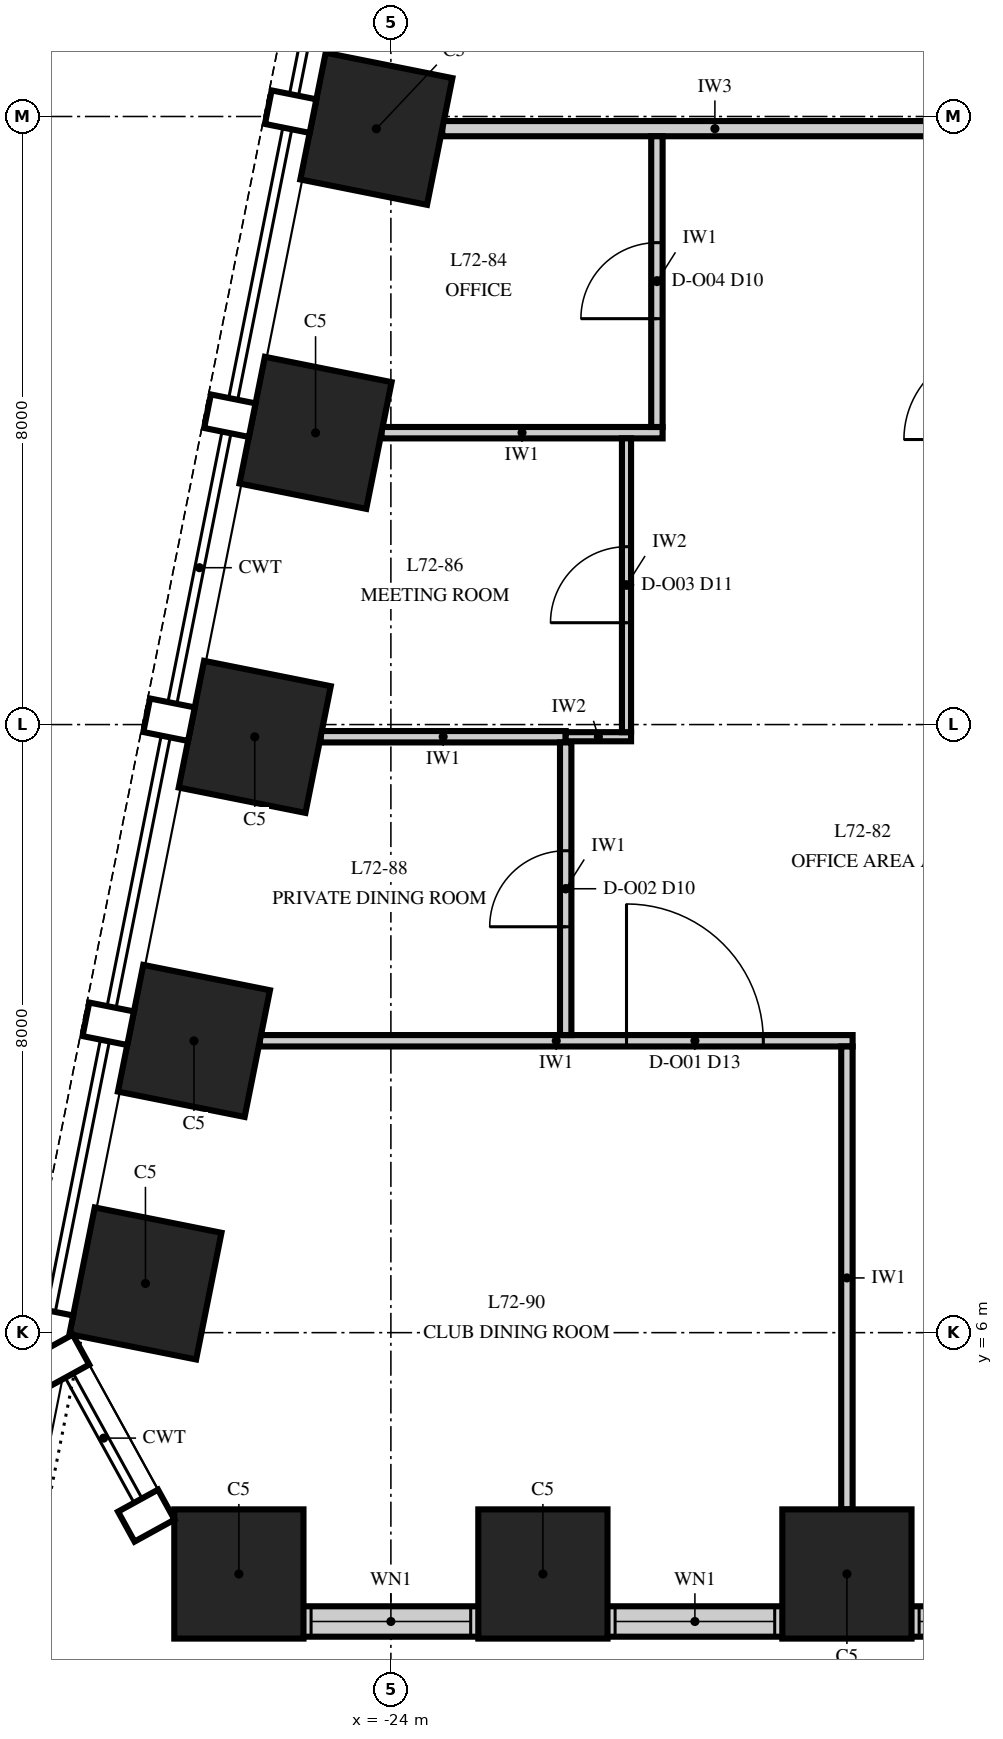
"""IFC4 building model, lengths in metres.
Left out: names, types, materials, properties, quantities, classifications, styles, units other than length and angle.
Written with IfcOpenShell. Run it as: python <this file> out.ifc"""

import sys

from ifc_helpers import new_model, si_unit, direction, frame, frame_2d, origin, origin_2d, place, context, subcontext, project, spatial, rectangle, extrude, element, fill, save


model = new_model("IFC4")
c1 = context("Model", 3, precision=1e-05, world=origin(), true_north=direction((0.0, 1.0)))
c2 = subcontext(c1, "Body", "Model", "MODEL_VIEW")
j1 = project(units=[si_unit("LENGTHUNIT", "METRE"), si_unit("PLANEANGLEUNIT", "RADIAN")], contexts=[c1])
p1 = place(None, origin())
s1 = spatial("IfcSite", under=j1, at=p1, CompositionType="ELEMENT")
p2 = place(p1, origin())
s2 = spatial("IfcBuilding", under=s1, at=p2, CompositionType="ELEMENT")
p3 = place(p2, frame((0.0, 0.0, 308.0)))
s3 = spatial("IfcBuildingStorey", under=s2, at=p3, CompositionType="ELEMENT", Elevation=308.0)
for number, where, z_axis, x_axis in (
    (1, (-26.0, 2.825, -0.25), (0.0, 0.0, 1.0), (1.0, 0.0, 0.0)),
    (2, (-22.0, 2.825, -0.25), (0.0, 0.0, 1.0), (1.0, 0.0, 0.0)),
    (3, (-18.0, 2.825, -0.25), (0.0, 0.0, 1.0), (1.0, 0.0, 0.0)),
):
    element("IfcColumn", number, at=place(p3, frame(where, z_axis=z_axis, x_axis=x_axis)), inside=s3, PredefinedType="COLUMN", context=c2, shape_type="SweptSolid", body=[
        extrude(rectangle(XDim=1.7, YDim=1.7, at=origin_2d()), origin(), (0.0, 0.0, 1.0), 4.25),
    ])
for number, where, z_axis, x_axis in (
    (4, (-24.191, 21.838, 0.0), (0.0, 0.0, 1.0), (-0.196, -0.981, 0.0)),
    (5, (-24.991, 17.838, 0.0), (0.0, 0.0, 1.0), (-0.196, -0.981, 0.0)),
    (6, (-25.791, 13.838, 0.0), (0.0, 0.0, 1.0), (-0.196, -0.981, 0.0)),
    (7, (-26.591, 9.838, 0.0), (0.0, 0.0, 1.0), (-0.196, -0.981, 0.0)),
    (8, (-27.229, 6.647, 0.0), (0.0, 0.0, 1.0), (-0.196, -0.981, 0.0)),
):
    element("IfcColumn", number, at=place(p3, frame(where, z_axis=z_axis, x_axis=x_axis)), inside=s3, PredefinedType="COLUMN", context=c2, shape_type="SweptSolid", body=[
        extrude(rectangle(XDim=1.7, YDim=1.7, at=origin_2d()), origin(), (0.0, 0.0, 1.0), 4.0),
    ])
p4 = place(p3, frame((-26.0, 2.2, 0.0), z_axis=(0.0, 0.0, 1.0), x_axis=(1.0, 0.0, 0.0)))
e9 = element("IfcWall", 9, at=p4, inside=s3, PredefinedType="SOLIDWALL", context=c2, shape_type="SweptSolid", body=[
    extrude(rectangle(XDim=52.0, YDim=0.4, at=frame_2d((26.0, 0.0))), origin(), (0.0, 0.0, 1.0), 2.0),
])
p5 = place(p4, frame((0.95, 0.0, 0.8)))
e10 = element("IfcOpeningElement", 10, at=p5, cuts=e9, PredefinedType="OPENING", context=c2, shape_type="SweptSolid", body=[
    extrude(rectangle(XDim=2.1, YDim=1.15, at=frame_2d((1.05, 0.575))), frame((0.0, 0.215, 0.0), z_axis=(0.0, -1.0, 0.0), x_axis=(1.0, 0.0, 0.0)), (0.0, 0.0, 1.0), 0.43),
])
p6 = place(p4, frame((4.95, 0.0, 0.8)))
e11 = element("IfcOpeningElement", 11, at=p6, cuts=e9, PredefinedType="OPENING", context=c2, shape_type="SweptSolid", body=[
    extrude(rectangle(XDim=2.1, YDim=1.15, at=frame_2d((1.05, 0.575))), frame((0.0, 0.215, 0.0), z_axis=(0.0, -1.0, 0.0), x_axis=(1.0, 0.0, 0.0)), (0.0, 0.0, 1.0), 0.43),
])
p7 = place(p4, frame((8.95, 0.0, 0.8)))
e12 = element("IfcOpeningElement", 12, at=p7, cuts=e9, PredefinedType="OPENING", context=c2, shape_type="SweptSolid", body=[
    extrude(rectangle(XDim=2.1, YDim=1.15, at=frame_2d((1.05, 0.575))), frame((0.0, 0.215, 0.0), z_axis=(0.0, -1.0, 0.0), x_axis=(1.0, 0.0, 0.0)), (0.0, 0.0, 1.0), 0.43),
])
p8 = place(p4, frame((12.95, 0.0, 0.8)))
e13 = element("IfcOpeningElement", 13, at=p8, cuts=e9, PredefinedType="OPENING", context=c2, shape_type="SweptSolid", body=[
    extrude(rectangle(XDim=2.1, YDim=1.15, at=frame_2d((1.05, 0.575))), frame((0.0, 0.215, 0.0), z_axis=(0.0, -1.0, 0.0), x_axis=(1.0, 0.0, 0.0)), (0.0, 0.0, 1.0), 0.43),
])
p9 = place(p4, frame((16.95, 0.0, 0.8)))
e14 = element("IfcOpeningElement", 14, at=p9, cuts=e9, PredefinedType="OPENING", context=c2, shape_type="SweptSolid", body=[
    extrude(rectangle(XDim=2.1, YDim=1.15, at=frame_2d((1.05, 0.575))), frame((0.0, 0.215, 0.0), z_axis=(0.0, -1.0, 0.0), x_axis=(1.0, 0.0, 0.0)), (0.0, 0.0, 1.0), 0.43),
])
p10 = place(p4, frame((21.1, 0.0, 0.0)))
e15 = element("IfcOpeningElement", 15, at=p10, cuts=e9, PredefinedType="OPENING", context=c2, shape_type="SweptSolid", body=[
    extrude(rectangle(XDim=1.8, YDim=2.0, at=frame_2d((0.9, 1.0))), frame((0.0, 0.215, 0.0), z_axis=(0.0, -1.0, 0.0), x_axis=(1.0, 0.0, 0.0)), (0.0, 0.0, 1.0), 0.43),
])
p11 = place(p4, frame((24.95, 0.0, 0.8)))
e16 = element("IfcOpeningElement", 16, at=p11, cuts=e9, PredefinedType="OPENING", context=c2, shape_type="SweptSolid", body=[
    extrude(rectangle(XDim=2.1, YDim=1.15, at=frame_2d((1.05, 0.575))), frame((0.0, 0.215, 0.0), z_axis=(0.0, -1.0, 0.0), x_axis=(1.0, 0.0, 0.0)), (0.0, 0.0, 1.0), 0.43),
])
p12 = place(p4, frame((29.1, 0.0, 0.0)))
e17 = element("IfcOpeningElement", 17, at=p12, cuts=e9, PredefinedType="OPENING", context=c2, shape_type="SweptSolid", body=[
    extrude(rectangle(XDim=1.8, YDim=2.0, at=frame_2d((0.9, 1.0))), frame((0.0, 0.215, 0.0), z_axis=(0.0, -1.0, 0.0), x_axis=(1.0, 0.0, 0.0)), (0.0, 0.0, 1.0), 0.43),
])
p13 = place(p4, frame((32.95, 0.0, 0.8)))
e18 = element("IfcOpeningElement", 18, at=p13, cuts=e9, PredefinedType="OPENING", context=c2, shape_type="SweptSolid", body=[
    extrude(rectangle(XDim=2.1, YDim=1.15, at=frame_2d((1.05, 0.575))), frame((0.0, 0.215, 0.0), z_axis=(0.0, -1.0, 0.0), x_axis=(1.0, 0.0, 0.0)), (0.0, 0.0, 1.0), 0.43),
])
p14 = place(p4, frame((36.95, 0.0, 0.8)))
e19 = element("IfcOpeningElement", 19, at=p14, cuts=e9, PredefinedType="OPENING", context=c2, shape_type="SweptSolid", body=[
    extrude(rectangle(XDim=2.1, YDim=1.15, at=frame_2d((1.05, 0.575))), frame((0.0, 0.215, 0.0), z_axis=(0.0, -1.0, 0.0), x_axis=(1.0, 0.0, 0.0)), (0.0, 0.0, 1.0), 0.43),
])
p15 = place(p4, frame((40.95, 0.0, 0.8)))
e20 = element("IfcOpeningElement", 20, at=p15, cuts=e9, PredefinedType="OPENING", context=c2, shape_type="SweptSolid", body=[
    extrude(rectangle(XDim=2.1, YDim=1.15, at=frame_2d((1.05, 0.575))), frame((0.0, 0.215, 0.0), z_axis=(0.0, -1.0, 0.0), x_axis=(1.0, 0.0, 0.0)), (0.0, 0.0, 1.0), 0.43),
])
p16 = place(p4, frame((44.95, 0.0, 0.8)))
e21 = element("IfcOpeningElement", 21, at=p16, cuts=e9, PredefinedType="OPENING", context=c2, shape_type="SweptSolid", body=[
    extrude(rectangle(XDim=2.1, YDim=1.15, at=frame_2d((1.05, 0.575))), frame((0.0, 0.215, 0.0), z_axis=(0.0, -1.0, 0.0), x_axis=(1.0, 0.0, 0.0)), (0.0, 0.0, 1.0), 0.43),
])
p17 = place(p4, frame((48.95, 0.0, 0.8)))
e22 = element("IfcOpeningElement", 22, at=p17, cuts=e9, PredefinedType="OPENING", context=c2, shape_type="SweptSolid", body=[
    extrude(rectangle(XDim=2.1, YDim=1.15, at=frame_2d((1.05, 0.575))), frame((0.0, 0.215, 0.0), z_axis=(0.0, -1.0, 0.0), x_axis=(1.0, 0.0, 0.0)), (0.0, 0.0, 1.0), 0.43),
])
p18 = place(p3, frame((-25.724, 9.84, 0.0), z_axis=(0.0, 0.0, 1.0), x_axis=(1.0, 0.0, 0.0)))
e23 = element("IfcWall", 23, at=p18, inside=s3, PredefinedType="PARTITIONING", context=c2, shape_type="SweptSolid", body=[
    extrude(rectangle(XDim=7.799, YDim=0.15, at=frame_2d((3.899, 0.0))), origin(), (0.0, 0.0, 1.0), 3.23),
])
p19 = place(p18, frame((4.824, 0.0, 0.0)))
e24 = element("IfcOpeningElement", 24, at=p19, cuts=e23, PredefinedType="OPENING", context=c2, shape_type="SweptSolid", body=[
    extrude(rectangle(XDim=1.8, YDim=2.4, at=frame_2d((0.9, 1.2))), frame((0.0, 0.09, 0.0), z_axis=(0.0, -1.0, 0.0), x_axis=(1.0, 0.0, 0.0)), (0.0, 0.0, 1.0), 0.18),
])
p20 = place(p3, frame((-24.924, 13.84, 0.0), z_axis=(0.0, 0.0, 1.0), x_axis=(1.0, 0.0, 0.0)))
e25 = element("IfcWall", 25, at=p20, inside=s3, PredefinedType="PARTITIONING", context=c2, shape_type="SweptSolid", body=[
    extrude(rectangle(XDim=3.224, YDim=0.15, at=frame_2d((1.612, 0.0))), origin(), (0.0, 0.0, 1.0), 3.23),
])
p21 = place(p3, frame((-21.7, 13.84, 0.0), z_axis=(0.0, 0.0, 1.0), x_axis=(1.0, 0.0, 0.0)))
e26 = element("IfcWall", 26, at=p21, inside=s3, PredefinedType="PARTITIONING", context=c2, shape_type="SweptSolid", body=[
    extrude(rectangle(XDim=0.86, YDim=0.12, at=frame_2d((0.43, 0.0))), origin(), (0.0, 0.0, 1.0), 3.85),
])
p22 = place(p3, frame((-24.124, 17.84, 0.0), z_axis=(0.0, 0.0, 1.0), x_axis=(1.0, 0.0, 0.0)))
e27 = element("IfcWall", 27, at=p22, inside=s3, PredefinedType="PARTITIONING", context=c2, shape_type="SweptSolid", body=[
    extrude(rectangle(XDim=3.699, YDim=0.15, at=frame_2d((1.849, 0.0))), origin(), (0.0, 0.0, 1.0), 3.23),
])
p23 = place(p3, frame((-23.324, 21.84, 0.0), z_axis=(0.0, 0.0, 1.0), x_axis=(1.0, 0.0, 0.0)))
e28 = element("IfcWall", 28, at=p23, inside=s3, PredefinedType="PARTITIONING", context=c2, shape_type="SweptSolid", body=[
    extrude(rectangle(XDim=7.174, YDim=0.2, at=frame_2d((3.587, 0.0))), origin(), (0.0, 0.0, 1.0), 3.23),
])
p24 = place(p3, frame((-21.7, 9.915, 0.0), z_axis=(0.0, 0.0, 1.0), x_axis=(0.0, 1.0, 0.0)))
e29 = element("IfcWall", 29, at=p24, inside=s3, PredefinedType="PARTITIONING", context=c2, shape_type="SweptSolid", body=[
    extrude(rectangle(XDim=3.85, YDim=0.15, at=frame_2d((1.925, 0.0))), origin(), (0.0, 0.0, 1.0), 3.85),
])
p25 = place(p24, frame((1.425, 0.0, 0.0)))
e30 = element("IfcOpeningElement", 30, at=p25, cuts=e29, PredefinedType="OPENING", context=c2, shape_type="SweptSolid", body=[
    extrude(rectangle(XDim=1.0, YDim=2.3, at=frame_2d((0.5, 1.15))), frame((0.0, 0.09, 0.0), z_axis=(0.0, -1.0, 0.0), x_axis=(1.0, 0.0, 0.0)), (0.0, 0.0, 1.0), 0.18),
])
p26 = place(p3, frame((-20.9, 13.9, 0.0), z_axis=(0.0, 0.0, 1.0), x_axis=(0.0, 1.0, 0.0)))
e31 = element("IfcWall", 31, at=p26, inside=s3, PredefinedType="PARTITIONING", context=c2, shape_type="SweptSolid", body=[
    extrude(rectangle(XDim=3.865, YDim=0.12, at=frame_2d((1.933, 0.0))), origin(), (0.0, 0.0, 1.0), 3.23),
])
p27 = place(p26, frame((1.44, 0.0, 0.0)))
e32 = element("IfcOpeningElement", 32, at=p27, cuts=e31, PredefinedType="OPENING", context=c2, shape_type="SweptSolid", body=[
    extrude(rectangle(XDim=1.0, YDim=2.4, at=frame_2d((0.5, 1.2))), frame((0.0, 0.075, 0.0), z_axis=(0.0, -1.0, 0.0), x_axis=(1.0, 0.0, 0.0)), (0.0, 0.0, 1.0), 0.15),
])
p28 = place(p3, frame((-20.5, 17.915, 0.0), z_axis=(0.0, 0.0, 1.0), x_axis=(0.0, 1.0, 0.0)))
e33 = element("IfcWall", 33, at=p28, inside=s3, PredefinedType="PARTITIONING", context=c2, shape_type="SweptSolid", body=[
    extrude(rectangle(XDim=3.825, YDim=0.15, at=frame_2d((1.913, 0.0))), origin(), (0.0, 0.0, 1.0), 3.23),
])
p29 = place(p28, frame((1.425, 0.0, 0.0)))
e34 = element("IfcOpeningElement", 34, at=p29, cuts=e33, PredefinedType="OPENING", context=c2, shape_type="SweptSolid", body=[
    extrude(rectangle(XDim=1.0, YDim=2.3, at=frame_2d((0.5, 1.15))), frame((0.0, 0.09, 0.0), z_axis=(0.0, -1.0, 0.0), x_axis=(1.0, 0.0, 0.0)), (0.0, 0.0, 1.0), 0.18),
])
p30 = place(p3, frame((-18.0, 3.675, 0.0), z_axis=(0.0, 0.0, 1.0), x_axis=(0.0, 1.0, 0.0)))
e35 = element("IfcWall", 35, at=p30, inside=s3, PredefinedType="PARTITIONING", context=c2, shape_type="SweptSolid", body=[
    extrude(rectangle(XDim=6.09, YDim=0.15, at=frame_2d((3.045, 0.0))), origin(), (0.0, 0.0, 1.0), 2.842),
])
p31 = place(p5, origin())
e36 = element("IfcWindow", 36, at=p31, inside=s3, PartitioningType="SINGLE_PANEL", PredefinedType="WINDOW", context=c2, shape_type="SweptSolid", body=[
    extrude(rectangle(XDim=2.1, YDim=1.15, at=frame_2d((1.05, 0.575))), frame((0.0, 0.03, 0.0), z_axis=(0.0, -1.0, 0.0), x_axis=(1.0, 0.0, 0.0)), (0.0, 0.0, 1.0), 0.06),
])
fill(e10, e36)
p32 = place(p6, origin())
e37 = element("IfcWindow", 37, at=p32, inside=s3, PartitioningType="SINGLE_PANEL", PredefinedType="WINDOW", context=c2, shape_type="SweptSolid", body=[
    extrude(rectangle(XDim=2.1, YDim=1.15, at=frame_2d((1.05, 0.575))), frame((0.0, 0.03, 0.0), z_axis=(0.0, -1.0, 0.0), x_axis=(1.0, 0.0, 0.0)), (0.0, 0.0, 1.0), 0.06),
])
fill(e11, e37)
p33 = place(p7, origin())
e38 = element("IfcWindow", 38, at=p33, inside=s3, PartitioningType="SINGLE_PANEL", PredefinedType="WINDOW", context=c2, shape_type="SweptSolid", body=[
    extrude(rectangle(XDim=2.1, YDim=1.15, at=frame_2d((1.05, 0.575))), frame((0.0, 0.03, 0.0), z_axis=(0.0, -1.0, 0.0), x_axis=(1.0, 0.0, 0.0)), (0.0, 0.0, 1.0), 0.06),
])
fill(e12, e38)
p34 = place(p19, origin())
e39 = element("IfcDoor", 39, at=p34, inside=s3, OperationType="DOUBLE_DOOR_SINGLE_SWING", PredefinedType="DOOR", context=c2, shape_type="SweptSolid", body=[
    extrude(rectangle(XDim=1.8, YDim=2.4, at=frame_2d((0.9, 1.2))), frame((0.0, 0.075, 0.0), z_axis=(0.0, -1.0, 0.0), x_axis=(1.0, 0.0, 0.0)), (0.0, 0.0, 1.0), 0.149),
])
fill(e24, e39)
p35 = place(p25, origin())
e40 = element("IfcDoor", 40, at=p35, inside=s3, OperationType="SINGLE_SWING_LEFT", PredefinedType="DOOR", context=c2, shape_type="SweptSolid", body=[
    extrude(rectangle(XDim=1.0, YDim=2.3, at=frame_2d((0.5, 1.15))), frame((0.0, 0.075, 0.0), z_axis=(0.0, -1.0, 0.0), x_axis=(1.0, 0.0, 0.0)), (0.0, 0.0, 1.0), 0.149),
])
fill(e30, e40)
p36 = place(p27, origin())
e41 = element("IfcDoor", 41, at=p36, inside=s3, OperationType="SINGLE_SWING_RIGHT", PredefinedType="DOOR", context=c2, shape_type="SweptSolid", body=[
    extrude(rectangle(XDim=1.0, YDim=2.4, at=frame_2d((0.5, 1.2))), frame((0.0, 0.06, 0.0), z_axis=(0.0, -1.0, 0.0), x_axis=(1.0, 0.0, 0.0)), (0.0, 0.0, 1.0), 0.12),
])
fill(e32, e41)
p37 = place(p29, origin())
e42 = element("IfcDoor", 42, at=p37, inside=s3, OperationType="SINGLE_SWING_LEFT", PredefinedType="DOOR", context=c2, shape_type="SweptSolid", body=[
    extrude(rectangle(XDim=1.0, YDim=2.3, at=frame_2d((0.5, 1.15))), frame((0.0, 0.075, 0.0), z_axis=(0.0, -1.0, 0.0), x_axis=(1.0, 0.0, 0.0)), (0.0, 0.0, 1.0), 0.149),
])
fill(e34, e42)
save(model, sys.argv[1])
